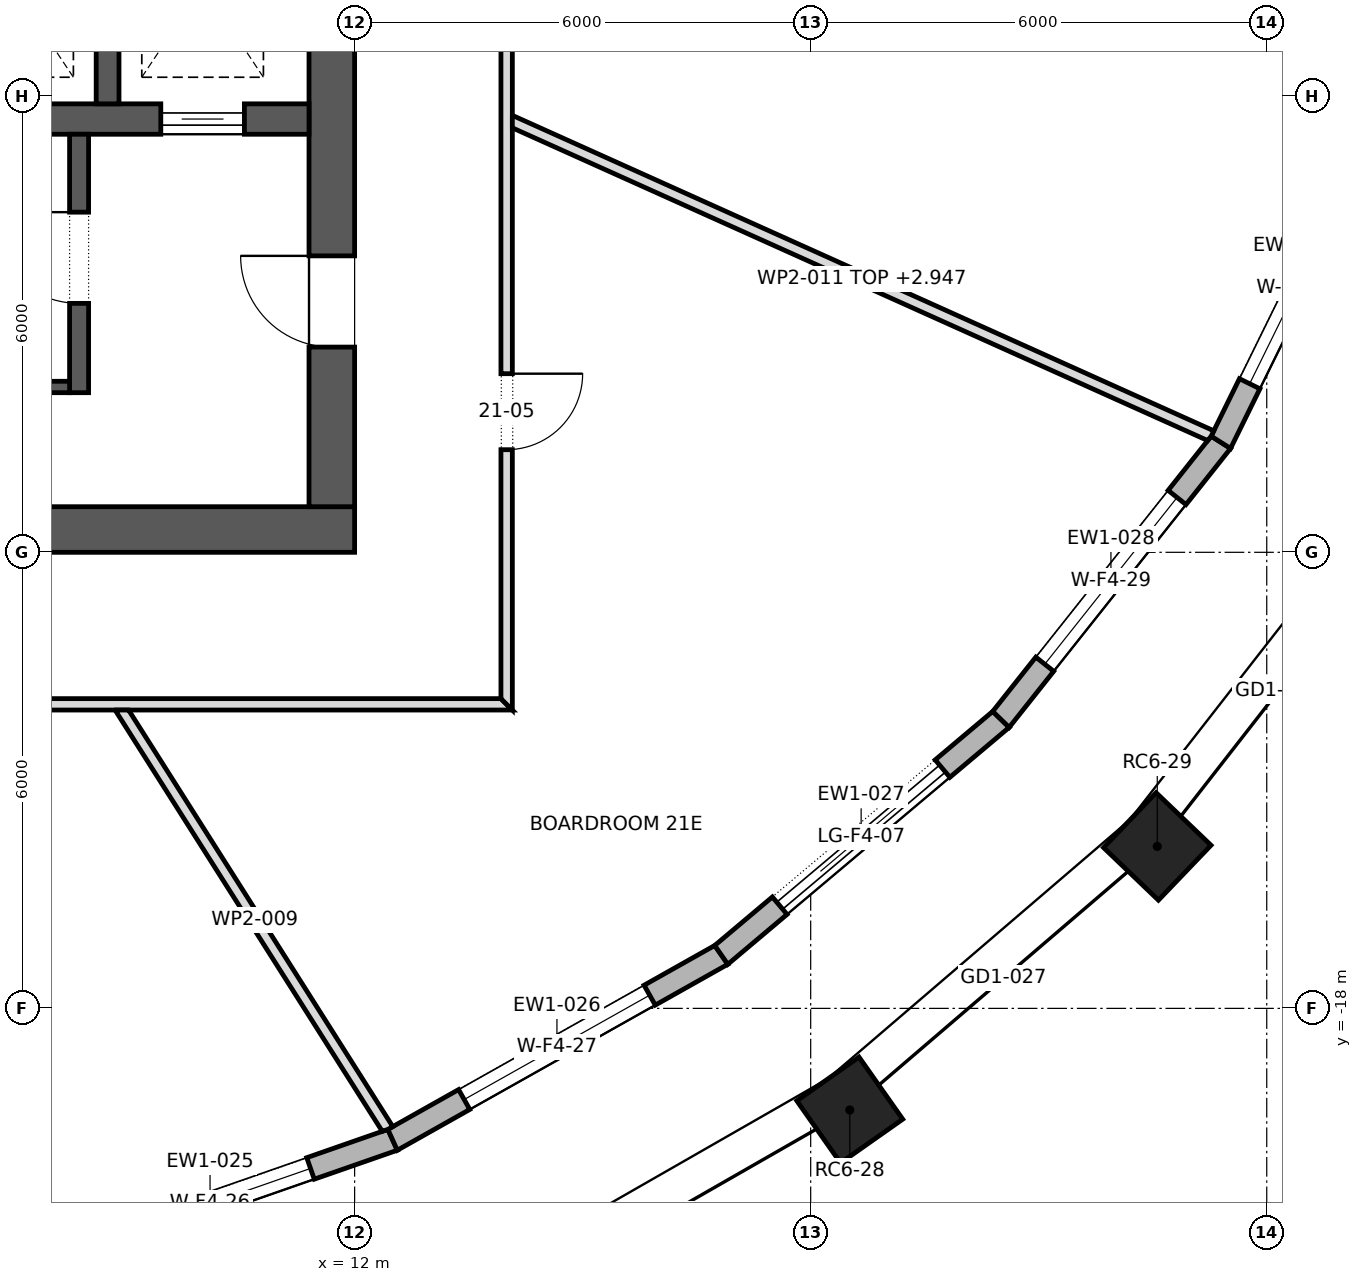
"""IFC4 building model, lengths in metres.
Left out: names, types, materials, properties, quantities, classifications, styles, units other than length and angle.
Written with IfcOpenShell. Run it as: python <this file> out.ifc"""

import sys

from ifc_helpers import new_model, si_unit, direction, frame, frame_2d, origin, origin_2d, place, context, subcontext, project, spatial, polyline, rectangle, outline, extrude, element, fill, save


model = new_model("IFC4")
c1 = context("Model", 3, precision=1e-05, world=origin(), true_north=direction((0.0, 1.0)))
c2 = subcontext(c1, "Body", "Model", "MODEL_VIEW")
j1 = project(units=[si_unit("LENGTHUNIT", "METRE"), si_unit("PLANEANGLEUNIT", "RADIAN")], contexts=[c1])
p1 = place(None, origin())
s1 = spatial("IfcSite", under=j1, at=p1, CompositionType="ELEMENT")
p2 = place(p1, origin())
s2 = spatial("IfcBuilding", under=s1, at=p2, CompositionType="ELEMENT")
p3 = place(p2, frame((0.0, 0.0, 292.3)))
s3 = spatial("IfcBuildingStorey", under=s2, at=p3, CompositionType="ELEMENT", Elevation=292.3)
for number, where, z_axis, x_axis in (
    (1, (18.514, -19.337, 0.0), (0.0, 0.0, 1.0), (0.818, 0.575, 0.0)),
    (2, (22.56, -15.869, 0.0), (0.0, 0.0, 1.0), (0.692, 0.722, 0.0)),
):
    element("IfcColumn", number, at=place(p3, frame(where, z_axis=z_axis, x_axis=x_axis)), inside=s3, PredefinedType="COLUMN", context=c2, shape_type="SweptSolid", body=[
        extrude(rectangle(XDim=1.0, YDim=1.0, at=origin_2d()), origin(), (0.0, 0.0, 1.0), 4.0),
    ])
p4 = place(p3, frame((-12.0, -11.7, 0.0), z_axis=(0.0, 0.0, 1.0), x_axis=(1.0, 0.0, 0.0)))
e3 = element("IfcWall", 3, at=p4, inside=s3, PredefinedType="SHEAR", context=c2, shape_type="SweptSolid", body=[
    extrude(rectangle(XDim=24.0, YDim=0.6, at=frame_2d((12.0, 0.0))), origin(), (0.0, 0.0, 1.0), 4.0),
])
p5 = place(p4, frame((9.975, 0.0, 0.0)))
e4 = element("IfcOpeningElement", 4, at=p5, cuts=e3, PredefinedType="OPENING", context=c2, shape_type="SweptSolid", body=[
    extrude(rectangle(XDim=0.9, YDim=2.1, at=frame_2d((0.45, 1.05))), frame((0.0, 0.312, 0.0), z_axis=(0.0, -1.0, 0.0), x_axis=(1.0, 0.0, 0.0)), (0.0, 0.0, 1.0), 0.624),
])
p6 = place(p4, frame((4.6, 0.0, 0.0)))
e5 = element("IfcOpeningElement", 5, at=p6, cuts=e3, PredefinedType="OPENING", context=c2, shape_type="SweptSolid", body=[
    extrude(rectangle(XDim=0.8, YDim=2.1, at=frame_2d((0.4, 1.05))), frame((0.0, 0.312, 0.0), z_axis=(0.0, -1.0, 0.0), x_axis=(1.0, 0.0, 0.0)), (0.0, 0.0, 1.0), 0.624),
])
p7 = place(p4, frame((7.0, 0.0, 0.0)))
e6 = element("IfcOpeningElement", 6, at=p7, cuts=e3, PredefinedType="OPENING", context=c2, shape_type="SweptSolid", body=[
    extrude(rectangle(XDim=0.8, YDim=2.1, at=frame_2d((0.4, 1.05))), frame((0.0, 0.312, 0.0), z_axis=(0.0, -1.0, 0.0), x_axis=(1.0, 0.0, 0.0)), (0.0, 0.0, 1.0), 0.624),
])
p8 = place(p4, frame((15.85, 0.0, 0.0)))
e7 = element("IfcOpeningElement", 7, at=p8, cuts=e3, PredefinedType="OPENING", context=c2, shape_type="SweptSolid", body=[
    extrude(rectangle(XDim=0.8, YDim=2.1, at=frame_2d((0.4, 1.05))), frame((0.0, 0.312, 0.0), z_axis=(0.0, -1.0, 0.0), x_axis=(1.0, 0.0, 0.0)), (0.0, 0.0, 1.0), 0.624),
])
p9 = place(p3, frame((11.7, -11.4, 0.0), z_axis=(0.0, 0.0, 1.0), x_axis=(0.0, 1.0, 0.0)))
e8 = element("IfcWall", 8, at=p9, inside=s3, PredefinedType="SHEAR", context=c2, shape_type="SweptSolid", body=[
    extrude(rectangle(XDim=22.8, YDim=0.6, at=frame_2d((11.4, 0.0))), origin(), (0.0, 0.0, 1.0), 4.0),
])
p10 = place(p9, frame((10.2, 0.0, 0.0)))
e9 = element("IfcOpeningElement", 9, at=p10, cuts=e8, PredefinedType="OPENING", context=c2, shape_type="SweptSolid", body=[
    extrude(rectangle(XDim=2.4, YDim=2.1, at=frame_2d((1.2, 1.05))), frame((0.0, 0.312, 0.0), z_axis=(0.0, -1.0, 0.0), x_axis=(1.0, 0.0, 0.0)), (0.0, 0.0, 1.0), 0.624),
])
p11 = place(p9, frame((19.5, 0.0, 0.0)))
e10 = element("IfcOpeningElement", 10, at=p11, cuts=e8, PredefinedType="OPENING", context=c2, shape_type="SweptSolid", body=[
    extrude(rectangle(XDim=1.2, YDim=2.1, at=frame_2d((0.6, 1.05))), frame((0.0, 0.312, 0.0), z_axis=(0.0, -1.0, 0.0), x_axis=(1.0, 0.0, 0.0)), (0.0, 0.0, 1.0), 0.624),
])
p12 = place(p9, frame((2.1, 0.0, 0.0)))
e11 = element("IfcOpeningElement", 11, at=p12, cuts=e8, PredefinedType="OPENING", context=c2, shape_type="SweptSolid", body=[
    extrude(rectangle(XDim=1.2, YDim=2.1, at=frame_2d((0.6, 1.05))), frame((0.0, 0.312, 0.0), z_axis=(0.0, -1.0, 0.0), x_axis=(1.0, 0.0, 0.0)), (0.0, 0.0, 1.0), 0.624),
])
p13 = place(p3, frame((-11.4, -6.3, 0.0), z_axis=(0.0, 0.0, 1.0), x_axis=(1.0, 0.0, 0.0)))
e12 = element("IfcWall", 12, at=p13, inside=s3, PredefinedType="SHEAR", context=c2, shape_type="SweptSolid", body=[
    extrude(rectangle(XDim=22.8, YDim=0.4, at=frame_2d((11.4, 0.0))), origin(), (0.0, 0.0, 1.0), 4.0),
])
p14 = place(p13, frame((20.85, 0.0, 0.0)))
e13 = element("IfcOpeningElement", 13, at=p14, cuts=e12, PredefinedType="OPENING", context=c2, shape_type="SweptSolid", body=[
    extrude(rectangle(XDim=1.1, YDim=2.1, at=frame_2d((0.55, 1.05))), frame((0.0, 0.212, 0.0), z_axis=(0.0, -1.0, 0.0), x_axis=(1.0, 0.0, 0.0)), (0.0, 0.0, 1.0), 0.424),
])
p15 = place(p3, frame((8.75, -6.1, 0.0), z_axis=(0.0, 0.0, 1.0), x_axis=(0.0, 1.0, 0.0)))
e14 = element("IfcWall", 14, at=p15, inside=s3, PredefinedType="SHEAR", context=c2, shape_type="SweptSolid", body=[
    extrude(rectangle(XDim=2.9, YDim=0.3, at=frame_2d((1.45, 0.0))), origin(), (0.0, 0.0, 1.0), 4.0),
])
p16 = place(p3, frame((7.696, -21.404, 0.0), z_axis=(0.0, 0.0, 1.0), x_axis=(0.944230376095, 0.329285585564, 0.0)))
e15 = element("IfcWall", 15, at=p16, inside=s3, PredefinedType="STANDARD", context=c2, shape_type="SweptSolid", body=[
    extrude(outline(polyline([(-0.013, -0.15), (5.1, -0.15), (5.073, 0.15), (0.013, 0.15), (-0.013, -0.15)])), origin(), (0.0, 0.0, 1.0), 3.7),
])
p17 = place(p16, frame((1.143, 0.0, 0.6)))
e16 = element("IfcOpeningElement", 16, at=p17, cuts=e15, PredefinedType="OPENING", context=c2, shape_type="SweptSolid", body=[
    extrude(rectangle(XDim=2.8, YDim=2.65, at=frame_2d((1.4, 1.325))), frame((0.0, 0.162, 0.0), z_axis=(0.0, -1.0, 0.0), x_axis=(1.0, 0.0, 0.0)), (0.0, 0.0, 1.0), 0.324),
])
p18 = place(p3, frame((12.5, -19.729, 0.0), z_axis=(0.0, 0.0, 1.0), x_axis=(0.871512454536, 0.490373369575, 0.0)))
e17 = element("IfcWall", 17, at=p18, inside=s3, PredefinedType="STANDARD", context=c2, shape_type="SweptSolid", body=[
    extrude(outline(polyline([(-0.013, -0.15), (4.976, -0.15), (4.948, 0.15), (0.013, 0.15), (-0.013, -0.15)])), origin(), (0.0, 0.0, 1.0), 3.7),
])
p19 = place(p18, frame((1.081, 0.0, 0.6)))
e18 = element("IfcOpeningElement", 18, at=p19, cuts=e17, PredefinedType="OPENING", context=c2, shape_type="SweptSolid", body=[
    extrude(rectangle(XDim=2.8, YDim=2.65, at=frame_2d((1.4, 1.325))), frame((0.0, 0.162, 0.0), z_axis=(0.0, -1.0, 0.0), x_axis=(1.0, 0.0, 0.0)), (0.0, 0.0, 1.0), 0.324),
])
p20 = place(p3, frame((16.824, -17.296, 0.0), z_axis=(0.0, 0.0, 1.0), x_axis=(0.764966473721, 0.644070100286, 0.0)))
e19 = element("IfcWall", 19, at=p20, inside=s3, PredefinedType="STANDARD", context=c2, shape_type="SweptSolid", body=[
    extrude(outline(polyline([(-0.014, -0.15), (4.825, -0.15), (4.795, 0.15), (0.014, 0.15), (-0.014, -0.15)])), origin(), (0.0, 0.0, 1.0), 3.7),
])
p21 = place(p20, frame((1.005, 0.0, 0.0)))
e20 = element("IfcOpeningElement", 20, at=p21, cuts=e19, PredefinedType="OPENING", context=c2, shape_type="SweptSolid", body=[
    extrude(rectangle(XDim=2.8, YDim=3.25, at=frame_2d((1.4, 1.625))), frame((0.0, 0.162, 0.0), z_axis=(0.0, -1.0, 0.0), x_axis=(1.0, 0.0, 0.0)), (0.0, 0.0, 1.0), 0.324),
])
p22 = place(p3, frame((20.503, -14.198, 0.0), z_axis=(0.0, 0.0, 1.0), x_axis=(0.621625671247, 0.783314448256, 0.0)))
e21 = element("IfcWall", 21, at=p22, inside=s3, PredefinedType="STANDARD", context=c2, shape_type="SweptSolid", body=[
    extrude(outline(polyline([(-0.015, -0.15), (4.67, -0.15), (4.637, 0.15), (0.015, 0.15), (-0.015, -0.15)])), origin(), (0.0, 0.0, 1.0), 3.7),
])
p23 = place(p22, frame((0.927, 0.0, 0.6)))
e22 = element("IfcOpeningElement", 22, at=p23, cuts=e21, PredefinedType="OPENING", context=c2, shape_type="SweptSolid", body=[
    extrude(rectangle(XDim=2.8, YDim=2.65, at=frame_2d((1.4, 1.325))), frame((0.0, 0.162, 0.0), z_axis=(0.0, -1.0, 0.0), x_axis=(1.0, 0.0, 0.0)), (0.0, 0.0, 1.0), 0.324),
])
p24 = place(p3, frame((23.396, -10.553, 0.0), z_axis=(0.0, 0.0, 1.0), x_axis=(0.441431671743, 0.897294867467, 0.0)))
e23 = element("IfcWall", 23, at=p24, inside=s3, PredefinedType="STANDARD", context=c2, shape_type="SweptSolid", body=[
    extrude(outline(polyline([(-0.016, -0.15), (4.534, -0.15), (4.5, 0.15), (0.016, 0.15), (-0.016, -0.15)])), origin(), (0.0, 0.0, 1.0), 3.7),
])
p25 = place(p24, frame((0.858, 0.0, 0.6)))
e24 = element("IfcOpeningElement", 24, at=p25, cuts=e23, PredefinedType="OPENING", context=c2, shape_type="SweptSolid", body=[
    extrude(rectangle(XDim=2.8, YDim=2.65, at=frame_2d((1.4, 1.325))), frame((0.0, 0.162, 0.0), z_axis=(0.0, -1.0, 0.0), x_axis=(1.0, 0.0, 0.0)), (0.0, 0.0, 1.0), 0.324),
])
p26 = place(p3, frame((8.375, -9.9, 0.0), z_axis=(0.0, 0.0, 1.0), x_axis=(0.0, 1.0, 0.0)))
e25 = element("IfcWall", 25, at=p26, inside=s3, PredefinedType="SHEAR", context=c2, shape_type="SweptSolid", body=[
    extrude(rectangle(XDim=3.4, YDim=0.25, at=frame_2d((1.7, 0.0))), origin(), (0.0, 0.0, 1.0), 3.7),
])
p27 = place(p26, frame((1.175, 0.0, 0.0)))
e26 = element("IfcOpeningElement", 26, at=p27, cuts=e25, PredefinedType="OPENING", context=c2, shape_type="SweptSolid", body=[
    extrude(rectangle(XDim=1.2, YDim=2.1, at=frame_2d((0.6, 1.05))), frame((0.0, 0.137, 0.0), z_axis=(0.0, -1.0, 0.0), x_axis=(1.0, 0.0, 0.0)), (0.0, 0.0, 1.0), 0.274),
])
p28 = place(p3, frame((0.25, -9.825, 0.0), z_axis=(0.0, 0.0, 1.0), x_axis=(1.0, 0.0, 0.0)))
e27 = element("IfcWall", 27, at=p28, inside=s3, PredefinedType="SHEAR", context=c2, shape_type="SweptSolid", body=[
    extrude(rectangle(XDim=8.0, YDim=0.15, at=frame_2d((4.0, 0.0))), origin(), (0.0, 0.0, 1.0), 3.7),
])
p29 = place(p3, frame((-14.075, -14.0, 0.0), z_axis=(0.0, 0.0, 1.0), x_axis=(1.0, 0.0, 0.0)))
e28 = element("IfcWall", 28, at=p29, inside=s3, PredefinedType="PARTITIONING", context=c2, shape_type="SweptSolid", body=[
    extrude(outline(polyline([(0.0, -0.075), (1.877, -0.075), (3.753, -0.075), (5.63, -0.075), (7.507, -0.075), (9.383, -0.075), (11.26, -0.075), (13.137, -0.075), (15.013, -0.075), (16.89, -0.075), (18.767, -0.075), (20.643, -0.075), (22.52, -0.075), (24.396, -0.075), (26.273, -0.075), (28.15, -0.075), (28.0, 0.075), (26.011, 0.075), (24.021, 0.075), (22.032, 0.075), (20.043, 0.075), (18.053, 0.075), (16.064, 0.075), (14.075, 0.075), (12.086, 0.075), (10.096, 0.075), (8.107, 0.075), (6.118, 0.075), (4.128, 0.075), (2.139, 0.075), (0.15, 0.075), (0.0, -0.075)])), origin(), (0.0, 0.0, 1.0), 3.7),
])
p30 = place(p29, frame((5.93, 0.0, 0.0)))
e29 = element("IfcOpeningElement", 29, at=p30, cuts=e28, PredefinedType="OPENING", context=c2, shape_type="SweptSolid", body=[
    extrude(rectangle(XDim=1.0, YDim=2.1, at=frame_2d((0.5, 1.05))), frame((0.0, 0.087, 0.0), z_axis=(0.0, -1.0, 0.0), x_axis=(1.0, 0.0, 0.0)), (0.0, 0.0, 1.0), 0.174),
])
p31 = place(p29, frame((17.2, 0.0, 0.0)))
e30 = element("IfcOpeningElement", 30, at=p31, cuts=e28, PredefinedType="OPENING", context=c2, shape_type="SweptSolid", body=[
    extrude(rectangle(XDim=1.0, YDim=2.1, at=frame_2d((0.5, 1.05))), frame((0.0, 0.087, 0.0), z_axis=(0.0, -1.0, 0.0), x_axis=(1.0, 0.0, 0.0)), (0.0, 0.0, 1.0), 0.174),
])
p32 = place(p3, frame((8.912, -14.035, 0.0), z_axis=(0.0, 0.0, 1.0), x_axis=(0.535569757711, -0.844490991442, 0.0)))
e31 = element("IfcWall", 31, at=p32, inside=s3, PredefinedType="PARTITIONING", context=c2, shape_type="SweptSolid", body=[
    extrude(outline(polyline([(0.0, -0.075), (1.641, -0.075), (3.281, -0.075), (4.922, -0.075), (6.563, -0.075), (6.581, 0.001), (6.585, 0.073), (6.585, 0.075), (4.962, 0.075), (3.34, 0.075), (1.718, 0.075), (0.095, 0.075), (0.0, -0.075), (0.0, -0.075)])), origin(), (0.0, 0.0, 1.0), 3.7),
])
p33 = place(p3, frame((14.0, -14.075, 0.0), z_axis=(0.0, 0.0, 1.0), x_axis=(0.0, 1.0, 0.0)))
e32 = element("IfcWall", 32, at=p33, inside=s3, PredefinedType="PARTITIONING", context=c2, shape_type="SweptSolid", body=[
    extrude(outline(polyline([(0.0, -0.075), (1.877, -0.075), (3.753, -0.075), (5.63, -0.075), (7.507, -0.075), (9.383, -0.075), (11.26, -0.075), (13.137, -0.075), (15.013, -0.075), (16.89, -0.075), (18.767, -0.075), (20.643, -0.075), (22.52, -0.075), (24.396, -0.075), (26.273, -0.075), (28.15, -0.075), (28.0, 0.075), (26.011, 0.075), (24.021, 0.075), (22.032, 0.075), (20.043, 0.075), (18.053, 0.075), (16.064, 0.075), (14.075, 0.075), (12.086, 0.075), (10.096, 0.075), (8.107, 0.075), (6.118, 0.075), (4.128, 0.075), (2.139, 0.075), (0.15, 0.075), (0.0, -0.075)])), origin(), (0.0, 0.0, 1.0), 3.7),
])
p34 = place(p33, frame((3.425, 0.0, 0.0)))
e33 = element("IfcOpeningElement", 33, at=p34, cuts=e32, PredefinedType="OPENING", context=c2, shape_type="SweptSolid", body=[
    extrude(rectangle(XDim=1.0, YDim=2.1, at=frame_2d((0.5, 1.05))), frame((0.0, 0.087, 0.0), z_axis=(0.0, -1.0, 0.0), x_axis=(1.0, 0.0, 0.0)), (0.0, 0.0, 1.0), 0.174),
])
p35 = place(p33, frame((11.815, 0.0, 0.0)))
e34 = element("IfcOpeningElement", 34, at=p35, cuts=e32, PredefinedType="OPENING", context=c2, shape_type="SweptSolid", body=[
    extrude(rectangle(XDim=1.8, YDim=2.1, at=frame_2d((0.9, 1.05))), frame((0.0, 0.087, 0.0), z_axis=(0.0, -1.0, 0.0), x_axis=(1.0, 0.0, 0.0)), (0.0, 0.0, 1.0), 0.174),
])
p36 = place(p33, frame((21.965, 0.0, 0.0)))
e35 = element("IfcOpeningElement", 35, at=p36, cuts=e32, PredefinedType="OPENING", context=c2, shape_type="SweptSolid", body=[
    extrude(rectangle(XDim=1.8, YDim=2.1, at=frame_2d((0.9, 1.05))), frame((0.0, 0.087, 0.0), z_axis=(0.0, -1.0, 0.0), x_axis=(1.0, 0.0, 0.0)), (0.0, 0.0, 1.0), 0.174),
])
p37 = place(p3, frame((14.045, -6.32, 0.0), z_axis=(0.0, 0.0, 1.0), x_axis=(0.912030730905, -0.410121867114, 0.0)))
e36 = element("IfcWall", 36, at=p37, inside=s3, PredefinedType="PARTITIONING", context=c2, shape_type="SweptSolid", body=[
    extrude(outline(polyline([(0.067, -0.075), (1.739, -0.075), (3.41, -0.075), (5.082, -0.075), (6.754, -0.075), (8.426, -0.075), (10.097, -0.075), (10.115, -0.004), (10.118, 0.073), (10.118, 0.075), (8.432, 0.075), (6.745, 0.075), (5.059, 0.075), (3.373, 0.075), (1.686, 0.075), (0.0, 0.075), (0.0, 0.074), (0.067, -0.075)])), origin(), (0.0, 0.0, 1.0), 2.947),
])
p38 = place(p17, origin())
e37 = element("IfcWindow", 37, at=p38, inside=s3, PartitioningType="DOUBLE_PANEL_VERTICAL", PredefinedType="WINDOW", context=c2, shape_type="SweptSolid", body=[
    extrude(rectangle(XDim=2.8, YDim=2.65, at=frame_2d((1.4, 1.325))), frame((0.0, 0.03, 0.0), z_axis=(0.0, -1.0, 0.0), x_axis=(1.0, 0.0, 0.0)), (0.0, 0.0, 1.0), 0.06),
])
fill(e16, e37)
p39 = place(p19, origin())
e38 = element("IfcWindow", 38, at=p39, inside=s3, PartitioningType="DOUBLE_PANEL_VERTICAL", PredefinedType="WINDOW", context=c2, shape_type="SweptSolid", body=[
    extrude(rectangle(XDim=2.8, YDim=2.65, at=frame_2d((1.4, 1.325))), frame((0.0, 0.03, 0.0), z_axis=(0.0, -1.0, 0.0), x_axis=(1.0, 0.0, 0.0)), (0.0, 0.0, 1.0), 0.06),
])
fill(e18, e38)
p40 = place(p21, origin())
e39 = element("IfcDoor", 39, at=p40, inside=s3, OperationType="DOUBLE_DOOR_SLIDING", PredefinedType="DOOR", context=c2, shape_type="SweptSolid", body=[
    extrude(rectangle(XDim=2.8, YDim=3.25, at=frame_2d((1.4, 1.625))), frame((0.0, 0.025, 0.0), z_axis=(0.0, -1.0, 0.0), x_axis=(1.0, 0.0, 0.0)), (0.0, 0.0, 1.0), 0.05),
])
fill(e20, e39)
p41 = place(p23, origin())
e40 = element("IfcWindow", 40, at=p41, inside=s3, PartitioningType="DOUBLE_PANEL_VERTICAL", PredefinedType="WINDOW", context=c2, shape_type="SweptSolid", body=[
    extrude(rectangle(XDim=2.8, YDim=2.65, at=frame_2d((1.4, 1.325))), frame((0.0, 0.03, 0.0), z_axis=(0.0, -1.0, 0.0), x_axis=(1.0, 0.0, 0.0)), (0.0, 0.0, 1.0), 0.06),
])
fill(e22, e40)
p42 = place(p25, origin())
e41 = element("IfcWindow", 41, at=p42, inside=s3, PartitioningType="DOUBLE_PANEL_VERTICAL", PredefinedType="WINDOW", context=c2, shape_type="SweptSolid", body=[
    extrude(rectangle(XDim=2.8, YDim=2.65, at=frame_2d((1.4, 1.325))), frame((0.0, 0.03, 0.0), z_axis=(0.0, -1.0, 0.0), x_axis=(1.0, 0.0, 0.0)), (0.0, 0.0, 1.0), 0.06),
])
fill(e24, e41)
p43 = place(p14, origin())
e42 = element("IfcDoor", 42, at=p43, inside=s3, OperationType="SLIDING_TO_LEFT", PredefinedType="DOOR", context=c2, shape_type="SweptSolid", body=[
    extrude(rectangle(XDim=1.1, YDim=2.1, at=frame_2d((0.55, 1.05))), frame((0.0, 0.025, 0.0), z_axis=(0.0, -1.0, 0.0), x_axis=(1.0, 0.0, 0.0)), (0.0, 0.0, 1.0), 0.05),
])
fill(e13, e42)
p44 = place(p27, origin())
e43 = element("IfcDoor", 43, at=p44, inside=s3, OperationType="SINGLE_SWING_LEFT", PredefinedType="DOOR", context=c2, shape_type="SweptSolid", body=[
    extrude(rectangle(XDim=1.2, YDim=2.1, at=frame_2d((0.6, 1.05))), frame((0.0, 0.025, 0.0), z_axis=(0.0, -1.0, 0.0), x_axis=(1.0, 0.0, 0.0)), (0.0, 0.0, 1.0), 0.05),
])
fill(e26, e43)
p45 = place(p12, origin())
e44 = element("IfcDoor", 44, at=p45, inside=s3, OperationType="SINGLE_SWING_LEFT", PredefinedType="DOOR", context=c2, shape_type="SweptSolid", body=[
    extrude(rectangle(XDim=1.2, YDim=2.1, at=frame_2d((0.6, 1.05))), frame((0.0, 0.025, 0.0), z_axis=(0.0, -1.0, 0.0), x_axis=(1.0, 0.0, 0.0)), (0.0, 0.0, 1.0), 0.05),
])
fill(e11, e44)
p46 = place(p34, frame((1.0, 0.0, 0.0), z_axis=(0.0, 0.0, 1.0), x_axis=(-1.0, 0.0, 0.0)))
e45 = element("IfcDoor", 45, at=p46, inside=s3, OperationType="SINGLE_SWING_RIGHT", PredefinedType="DOOR", context=c2, shape_type="SweptSolid", body=[
    extrude(rectangle(XDim=1.0, YDim=2.1, at=frame_2d((0.5, 1.05))), frame((0.0, 0.025, 0.0), z_axis=(0.0, -1.0, 0.0), x_axis=(1.0, 0.0, 0.0)), (0.0, 0.0, 1.0), 0.05),
])
fill(e33, e45)
save(model, sys.argv[1])
